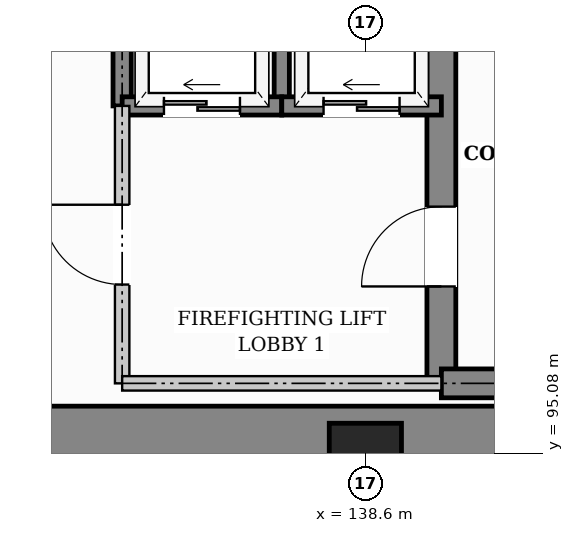
"""IFC4 building model, lengths in metres.
Left out: names, types, materials, properties, quantities, classifications, styles, units other than length and angle.
Written with IfcOpenShell. Run it as: python <this file> out.ifc"""

import sys

from ifc_helpers import new_model, si_unit, direction, frame, frame_2d, origin, origin_2d, place, context, subcontext, project, spatial, rectangle, extrude, element, fill, save


model = new_model("IFC4")
c1 = context("Model", 3, precision=1e-05, world=origin(), true_north=direction((0.0, 1.0)))
c2 = subcontext(c1, "Body", "Model", "MODEL_VIEW")
j1 = project(units=[si_unit("LENGTHUNIT", "METRE"), si_unit("PLANEANGLEUNIT", "RADIAN")], contexts=[c1])
p1 = place(None, origin())
s1 = spatial("IfcSite", under=j1, at=p1, CompositionType="ELEMENT")
p2 = place(p1, origin())
s2 = spatial("IfcBuilding", under=s1, at=p2, CompositionType="ELEMENT")
p3 = place(p2, frame((0.0, 0.0, -4.2)))
s3 = spatial("IfcBuildingStorey", under=s2, at=p3, CompositionType="ELEMENT", Elevation=-4.2)
p4 = place(p3, frame((138.6, 95.0, 0.0), z_axis=(0.0, 0.0, 1.0), x_axis=(1.0, 0.0, 0.0)))
e1 = element("IfcColumn", 1, at=p4, inside=s3, PredefinedType="COLUMN", context=c2, shape_type="SweptSolid", body=[
    extrude(rectangle(XDim=0.95, YDim=0.95, at=origin_2d()), origin(), (0.0, 0.0, 1.0), 4.2),
])
p5 = place(p3, frame((147.25, 95.35, 0.0), z_axis=(0.0, 0.0, 1.0), x_axis=(-1.0, 0.0, 0.0)))
e2 = element("IfcWall", 2, at=p5, inside=s3, PredefinedType="SOLIDWALL", context=c2, shape_type="SweptSolid", body=[
    extrude(rectangle(XDim=33.5, YDim=0.7, at=frame_2d((16.75, 0.0))), origin(), (0.0, 0.0, 1.0), 3.84),
])
p6 = place(p3, frame((139.6, 96.0, 0.0), z_axis=(0.0, 0.0, 1.0), x_axis=(0.0, 1.0, 0.0)))
e3 = element("IfcWall", 3, at=p6, inside=s3, PredefinedType="SHEAR", context=c2, shape_type="SweptSolid", body=[
    extrude(rectangle(XDim=6.0, YDim=0.38, at=frame_2d((3.0, 0.0))), origin(), (0.0, 0.0, 1.0), 3.84),
])
p7 = place(p6, frame((1.275, 0.0, 0.0)))
e4 = element("IfcOpeningElement", 4, at=p7, cuts=e3, PredefinedType="OPENING", context=c2, shape_type="SweptSolid", body=[
    extrude(rectangle(XDim=1.05, YDim=2.15, at=frame_2d((0.525, 1.075))), frame((0.0, 0.2, 0.0), z_axis=(0.0, -1.0, 0.0), x_axis=(1.0, 0.0, 0.0)), (0.0, 0.0, 1.0), 0.4),
])
p8 = place(p3, frame((139.6, 96.0, 0.0), z_axis=(0.0, 0.0, 1.0), x_axis=(1.0, 0.0, 0.0)))
e5 = element("IfcWall", 5, at=p8, inside=s3, PredefinedType="SHEAR", context=c2, shape_type="SweptSolid", body=[
    extrude(rectangle(XDim=7.0, YDim=0.38, at=frame_2d((3.5, 0.0))), origin(), (0.0, 0.0, 1.0), 3.84),
])
p9 = place(p3, frame((135.4, 99.65, 0.0), z_axis=(0.0, 0.0, 1.0), x_axis=(0.0, 1.0, 0.0)))
e6 = element("IfcWall", 6, at=p9, inside=s3, PredefinedType="SHEAR", context=c2, shape_type="SweptSolid", body=[
    extrude(rectangle(XDim=2.35, YDim=0.24, at=frame_2d((1.175, 0.0))), origin(), (0.0, 0.0, 1.0), 3.84),
])
p10 = place(p3, frame((137.5, 99.65, 0.0), z_axis=(0.0, 0.0, 1.0), x_axis=(0.0, 1.0, 0.0)))
e7 = element("IfcWall", 7, at=p10, inside=s3, PredefinedType="SHEAR", context=c2, shape_type="SweptSolid", body=[
    extrude(rectangle(XDim=2.35, YDim=0.2, at=frame_2d((1.175, 0.0))), origin(), (0.0, 0.0, 1.0), 3.84),
])
p11 = place(p3, frame((135.4, 99.65, 0.0), z_axis=(0.0, 0.0, 1.0), x_axis=(1.0, 0.0, 0.0)))
e8 = element("IfcWall", 8, at=p11, inside=s3, PredefinedType="SHEAR", context=c2, shape_type="SweptSolid", body=[
    extrude(rectangle(XDim=2.1, YDim=0.24, at=frame_2d((1.05, 0.0))), origin(), (0.0, 0.0, 1.0), 3.84),
])
p12 = place(p11, frame((0.55, 0.0, 0.0)))
e9 = element("IfcOpeningElement", 9, at=p12, cuts=e8, PredefinedType="OPENING", context=c2, shape_type="SweptSolid", body=[
    extrude(rectangle(XDim=1.0, YDim=2.1, at=frame_2d((0.5, 1.05))), frame((0.0, 0.13, 0.0), z_axis=(0.0, -1.0, 0.0), x_axis=(1.0, 0.0, 0.0)), (0.0, 0.0, 1.0), 0.26),
])
p13 = place(p3, frame((137.5, 99.65, 0.0), z_axis=(0.0, 0.0, 1.0), x_axis=(1.0, 0.0, 0.0)))
e10 = element("IfcWall", 10, at=p13, inside=s3, PredefinedType="SHEAR", context=c2, shape_type="SweptSolid", body=[
    extrude(rectangle(XDim=2.1, YDim=0.24, at=frame_2d((1.05, 0.0))), origin(), (0.0, 0.0, 1.0), 3.84),
])
p14 = place(p13, frame((0.55, 0.0, 0.0)))
e11 = element("IfcOpeningElement", 11, at=p14, cuts=e10, PredefinedType="OPENING", context=c2, shape_type="SweptSolid", body=[
    extrude(rectangle(XDim=1.0, YDim=2.1, at=frame_2d((0.5, 1.05))), frame((0.0, 0.13, 0.0), z_axis=(0.0, -1.0, 0.0), x_axis=(1.0, 0.0, 0.0)), (0.0, 0.0, 1.0), 0.26),
])
p15 = place(p3, frame((135.4, 96.0, 0.0), z_axis=(0.0, 0.0, 1.0), x_axis=(0.0, 1.0, 0.0)))
e12 = element("IfcWall", 12, at=p15, inside=s3, PredefinedType="PARTITIONING", context=c2, shape_type="SweptSolid", body=[
    extrude(rectangle(XDim=3.65, YDim=0.19, at=frame_2d((1.825, 0.0))), origin(), (0.0, 0.0, 1.0), 3.84),
])
p16 = place(p15, frame((1.3, 0.0, 0.0)))
e13 = element("IfcOpeningElement", 13, at=p16, cuts=e12, PredefinedType="OPENING", context=c2, shape_type="SweptSolid", body=[
    extrude(rectangle(XDim=1.05, YDim=2.15, at=frame_2d((0.525, 1.075))), frame((0.0, 0.105, 0.0), z_axis=(0.0, -1.0, 0.0), x_axis=(1.0, 0.0, 0.0)), (0.0, 0.0, 1.0), 0.21),
])
p17 = place(p3, frame((135.4, 96.0, 0.0), z_axis=(0.0, 0.0, 1.0), x_axis=(1.0, 0.0, 0.0)))
e14 = element("IfcWall", 14, at=p17, inside=s3, PredefinedType="PARTITIONING", context=c2, shape_type="SweptSolid", body=[
    extrude(rectangle(XDim=4.2, YDim=0.19, at=frame_2d((2.1, 0.0))), origin(), (0.0, 0.0, 1.0), 3.84),
])
p18 = place(p7, origin())
e15 = element("IfcDoor", 15, at=p18, inside=s3, OperationType="SINGLE_SWING_LEFT", PredefinedType="DOOR", context=c2, shape_type="SweptSolid", body=[
    extrude(rectangle(XDim=1.05, YDim=2.15, at=frame_2d((0.525, 1.075))), frame((0.0, 0.025, 0.0), z_axis=(0.0, -1.0, 0.0), x_axis=(1.0, 0.0, 0.0)), (0.0, 0.0, 1.0), 0.05),
])
fill(e4, e15)
p19 = place(p12, origin())
e16 = element("IfcDoor", 16, at=p19, inside=s3, OperationType="SLIDING_TO_LEFT", PredefinedType="DOOR", context=c2, shape_type="SweptSolid", body=[
    extrude(rectangle(XDim=1.0, YDim=2.1, at=frame_2d((0.5, 1.05))), frame((0.0, 0.025, 0.0), z_axis=(0.0, -1.0, 0.0), x_axis=(1.0, 0.0, 0.0)), (0.0, 0.0, 1.0), 0.05),
])
fill(e9, e16)
p20 = place(p14, origin())
e17 = element("IfcDoor", 17, at=p20, inside=s3, OperationType="SLIDING_TO_LEFT", PredefinedType="DOOR", context=c2, shape_type="SweptSolid", body=[
    extrude(rectangle(XDim=1.0, YDim=2.1, at=frame_2d((0.5, 1.05))), frame((0.0, 0.025, 0.0), z_axis=(0.0, -1.0, 0.0), x_axis=(1.0, 0.0, 0.0)), (0.0, 0.0, 1.0), 0.05),
])
fill(e11, e17)
p21 = place(p16, origin())
e18 = element("IfcDoor", 18, at=p21, inside=s3, OperationType="SINGLE_SWING_RIGHT", PredefinedType="DOOR", context=c2, shape_type="SweptSolid", body=[
    extrude(rectangle(XDim=1.05, YDim=2.15, at=frame_2d((0.525, 1.075))), frame((0.0, 0.025, 0.0), z_axis=(0.0, -1.0, 0.0), x_axis=(1.0, 0.0, 0.0)), (0.0, 0.0, 1.0), 0.05),
])
fill(e13, e18)
save(model, sys.argv[1])
